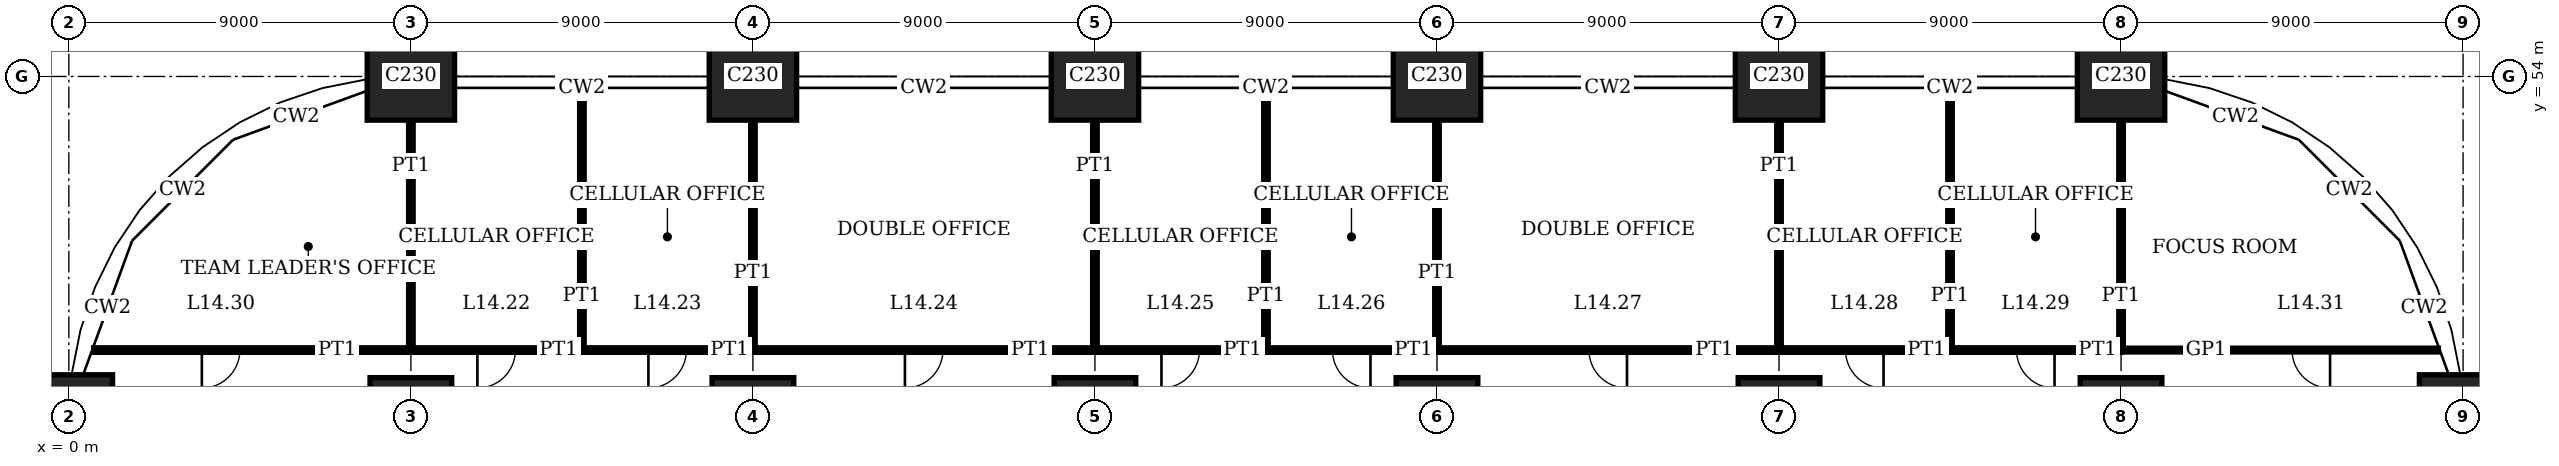
"""IFC4 building model, lengths in metres.
Left out: names, types, materials, properties, quantities, classifications, styles, units other than length and angle.
Written with IfcOpenShell. Run it as: python <this file> out.ifc"""

import sys

from ifc_helpers import new_model, si_unit, direction, frame, frame_2d, origin, origin_2d, place, context, subcontext, project, spatial, rectangle, extrude, element, fill, save


model = new_model("IFC4")
c1 = context("Model", 3, precision=1e-05, world=origin(), true_north=direction((0.0, 1.0)))
c2 = subcontext(c1, "Body", "Model", "MODEL_VIEW")
j1 = project(units=[si_unit("LENGTHUNIT", "METRE"), si_unit("PLANEANGLEUNIT", "RADIAN")], contexts=[c1])
p1 = place(None, origin())
s1 = spatial("IfcSite", under=j1, at=p1, CompositionType="ELEMENT")
p2 = place(p1, origin())
s2 = spatial("IfcBuilding", under=s1, at=p2, CompositionType="ELEMENT")
p3 = place(p2, frame((0.0, 0.0, 59.8)))
s3 = spatial("IfcBuildingStorey", under=s2, at=p3, CompositionType="ELEMENT", Elevation=59.8)
p4 = place(p3, frame((0.0, 45.0, 0.0), z_axis=(0.0, 0.0, 1.0), x_axis=(1.0, 0.0, 0.0)))
e1 = element("IfcColumn", 1, at=p4, inside=s3, PredefinedType="COLUMN", context=c2, shape_type="SweptSolid", body=[
    extrude(rectangle(XDim=2.3, YDim=2.3, at=origin_2d()), origin(), (0.0, 0.0, 1.0), 4.0),
])
p5 = place(p3, frame((9.0, 45.0, 0.0), z_axis=(0.0, 0.0, 1.0), x_axis=(1.0, 0.0, 0.0)))
e2 = element("IfcColumn", 2, at=p5, inside=s3, PredefinedType="COLUMN", context=c2, shape_type="SweptSolid", body=[
    extrude(rectangle(XDim=2.15, YDim=2.15, at=origin_2d()), origin(), (0.0, 0.0, 1.0), 4.0),
])
p6 = place(p3, frame((9.0, 54.0, 0.0), z_axis=(0.0, 0.0, 1.0), x_axis=(1.0, 0.0, 0.0)))
e3 = element("IfcColumn", 3, at=p6, inside=s3, PredefinedType="COLUMN", context=c2, shape_type="SweptSolid", body=[
    extrude(rectangle(XDim=2.3, YDim=2.3, at=origin_2d()), origin(), (0.0, 0.0, 1.0), 4.0),
])
p7 = place(p3, frame((18.0, 45.0, 0.0), z_axis=(0.0, 0.0, 1.0), x_axis=(1.0, 0.0, 0.0)))
e4 = element("IfcColumn", 4, at=p7, inside=s3, PredefinedType="COLUMN", context=c2, shape_type="SweptSolid", body=[
    extrude(rectangle(XDim=2.15, YDim=2.15, at=origin_2d()), origin(), (0.0, 0.0, 1.0), 4.0),
])
p8 = place(p3, frame((18.0, 54.0, 0.0), z_axis=(0.0, 0.0, 1.0), x_axis=(1.0, 0.0, 0.0)))
e5 = element("IfcColumn", 5, at=p8, inside=s3, PredefinedType="COLUMN", context=c2, shape_type="SweptSolid", body=[
    extrude(rectangle(XDim=2.3, YDim=2.3, at=origin_2d()), origin(), (0.0, 0.0, 1.0), 4.0),
])
p9 = place(p3, frame((27.0, 45.0, 0.0), z_axis=(0.0, 0.0, 1.0), x_axis=(1.0, 0.0, 0.0)))
e6 = element("IfcColumn", 6, at=p9, inside=s3, PredefinedType="COLUMN", context=c2, shape_type="SweptSolid", body=[
    extrude(rectangle(XDim=2.15, YDim=2.15, at=origin_2d()), origin(), (0.0, 0.0, 1.0), 4.0),
])
p10 = place(p3, frame((27.0, 54.0, 0.0), z_axis=(0.0, 0.0, 1.0), x_axis=(1.0, 0.0, 0.0)))
e7 = element("IfcColumn", 7, at=p10, inside=s3, PredefinedType="COLUMN", context=c2, shape_type="SweptSolid", body=[
    extrude(rectangle(XDim=2.3, YDim=2.3, at=origin_2d()), origin(), (0.0, 0.0, 1.0), 4.0),
])
p11 = place(p3, frame((36.0, 45.0, 0.0), z_axis=(0.0, 0.0, 1.0), x_axis=(1.0, 0.0, 0.0)))
e8 = element("IfcColumn", 8, at=p11, inside=s3, PredefinedType="COLUMN", context=c2, shape_type="SweptSolid", body=[
    extrude(rectangle(XDim=2.15, YDim=2.15, at=origin_2d()), origin(), (0.0, 0.0, 1.0), 4.0),
])
p12 = place(p3, frame((36.0, 54.0, 0.0), z_axis=(0.0, 0.0, 1.0), x_axis=(1.0, 0.0, 0.0)))
e9 = element("IfcColumn", 9, at=p12, inside=s3, PredefinedType="COLUMN", context=c2, shape_type="SweptSolid", body=[
    extrude(rectangle(XDim=2.3, YDim=2.3, at=origin_2d()), origin(), (0.0, 0.0, 1.0), 4.0),
])
p13 = place(p3, frame((45.0, 45.0, 0.0), z_axis=(0.0, 0.0, 1.0), x_axis=(1.0, 0.0, 0.0)))
e10 = element("IfcColumn", 10, at=p13, inside=s3, PredefinedType="COLUMN", context=c2, shape_type="SweptSolid", body=[
    extrude(rectangle(XDim=2.15, YDim=2.15, at=origin_2d()), origin(), (0.0, 0.0, 1.0), 4.0),
])
p14 = place(p3, frame((45.0, 54.0, 0.0), z_axis=(0.0, 0.0, 1.0), x_axis=(1.0, 0.0, 0.0)))
e11 = element("IfcColumn", 11, at=p14, inside=s3, PredefinedType="COLUMN", context=c2, shape_type="SweptSolid", body=[
    extrude(rectangle(XDim=2.3, YDim=2.3, at=origin_2d()), origin(), (0.0, 0.0, 1.0), 4.0),
])
p15 = place(p3, frame((54.0, 45.0, 0.0), z_axis=(0.0, 0.0, 1.0), x_axis=(1.0, 0.0, 0.0)))
e12 = element("IfcColumn", 12, at=p15, inside=s3, PredefinedType="COLUMN", context=c2, shape_type="SweptSolid", body=[
    extrude(rectangle(XDim=2.15, YDim=2.15, at=origin_2d()), origin(), (0.0, 0.0, 1.0), 4.0),
])
for number, where, z_axis, x_axis in (
    (13, (54.0, 54.0, 0.0), (0.0, 0.0, 1.0), (1.0, 0.0, 0.0)),
    (14, (63.0, 45.0, 0.0), (0.0, 0.0, 1.0), (1.0, 0.0, 0.0)),
):
    element("IfcColumn", number, at=place(p3, frame(where, z_axis=z_axis, x_axis=x_axis)), inside=s3, PredefinedType="COLUMN", context=c2, shape_type="SweptSolid", body=[
        extrude(rectangle(XDim=2.3, YDim=2.3, at=origin_2d()), origin(), (0.0, 0.0, 1.0), 4.0),
    ])
p16 = place(p3, frame((9.0, 46.8, 0.0), z_axis=(0.0, 0.0, 1.0), x_axis=(1.0, 0.0, 0.0)))
e15 = element("IfcWall", 15, at=p16, inside=s3, PredefinedType="PARTITIONING", context=c2, shape_type="SweptSolid", body=[
    extrude(rectangle(XDim=4.5, YDim=0.12, at=frame_2d((2.25, 0.0))), origin(), (0.0, 0.0, 1.0), 3.75),
])
p17 = place(p16, frame((1.75, 0.0, 0.0)))
e16 = element("IfcOpeningElement", 16, at=p17, cuts=e15, PredefinedType="OPENING", context=c2, shape_type="SweptSolid", body=[
    extrude(rectangle(XDim=1.0, YDim=2.4, at=frame_2d((0.5, 1.2))), frame((0.0, 0.07, 0.0), z_axis=(0.0, -1.0, 0.0), x_axis=(1.0, 0.0, 0.0)), (0.0, 0.0, 1.0), 0.14),
])
p18 = place(p3, frame((13.5, 46.8, 0.0), z_axis=(0.0, 0.0, 1.0), x_axis=(1.0, 0.0, 0.0)))
e17 = element("IfcWall", 17, at=p18, inside=s3, PredefinedType="PARTITIONING", context=c2, shape_type="SweptSolid", body=[
    extrude(rectangle(XDim=4.5, YDim=0.12, at=frame_2d((2.25, 0.0))), origin(), (0.0, 0.0, 1.0), 3.75),
])
p19 = place(p18, frame((1.75, 0.0, 0.0)))
e18 = element("IfcOpeningElement", 18, at=p19, cuts=e17, PredefinedType="OPENING", context=c2, shape_type="SweptSolid", body=[
    extrude(rectangle(XDim=1.0, YDim=2.4, at=frame_2d((0.5, 1.2))), frame((0.0, 0.07, 0.0), z_axis=(0.0, -1.0, 0.0), x_axis=(1.0, 0.0, 0.0)), (0.0, 0.0, 1.0), 0.14),
])
p20 = place(p3, frame((18.0, 46.8, 0.0), z_axis=(0.0, 0.0, 1.0), x_axis=(1.0, 0.0, 0.0)))
e19 = element("IfcWall", 19, at=p20, inside=s3, PredefinedType="PARTITIONING", context=c2, shape_type="SweptSolid", body=[
    extrude(rectangle(XDim=9.0, YDim=0.12, at=frame_2d((4.5, 0.0))), origin(), (0.0, 0.0, 1.0), 3.75),
])
p21 = place(p20, frame((4.0, 0.0, 0.0)))
e20 = element("IfcOpeningElement", 20, at=p21, cuts=e19, PredefinedType="OPENING", context=c2, shape_type="SweptSolid", body=[
    extrude(rectangle(XDim=1.0, YDim=2.4, at=frame_2d((0.5, 1.2))), frame((0.0, 0.07, 0.0), z_axis=(0.0, -1.0, 0.0), x_axis=(1.0, 0.0, 0.0)), (0.0, 0.0, 1.0), 0.14),
])
p22 = place(p3, frame((27.0, 46.8, 0.0), z_axis=(0.0, 0.0, 1.0), x_axis=(1.0, 0.0, 0.0)))
e21 = element("IfcWall", 21, at=p22, inside=s3, PredefinedType="PARTITIONING", context=c2, shape_type="SweptSolid", body=[
    extrude(rectangle(XDim=4.5, YDim=0.12, at=frame_2d((2.25, 0.0))), origin(), (0.0, 0.0, 1.0), 3.75),
])
p23 = place(p22, frame((1.75, 0.0, 0.0)))
e22 = element("IfcOpeningElement", 22, at=p23, cuts=e21, PredefinedType="OPENING", context=c2, shape_type="SweptSolid", body=[
    extrude(rectangle(XDim=1.0, YDim=2.4, at=frame_2d((0.5, 1.2))), frame((0.0, 0.07, 0.0), z_axis=(0.0, -1.0, 0.0), x_axis=(1.0, 0.0, 0.0)), (0.0, 0.0, 1.0), 0.14),
])
p24 = place(p3, frame((31.5, 46.8, 0.0), z_axis=(0.0, 0.0, 1.0), x_axis=(1.0, 0.0, 0.0)))
e23 = element("IfcWall", 23, at=p24, inside=s3, PredefinedType="PARTITIONING", context=c2, shape_type="SweptSolid", body=[
    extrude(rectangle(XDim=4.5, YDim=0.12, at=frame_2d((2.25, 0.0))), origin(), (0.0, 0.0, 1.0), 3.75),
])
p25 = place(p24, frame((1.75, 0.0, 0.0)))
e24 = element("IfcOpeningElement", 24, at=p25, cuts=e23, PredefinedType="OPENING", context=c2, shape_type="SweptSolid", body=[
    extrude(rectangle(XDim=1.0, YDim=2.4, at=frame_2d((0.5, 1.2))), frame((0.0, 0.07, 0.0), z_axis=(0.0, -1.0, 0.0), x_axis=(1.0, 0.0, 0.0)), (0.0, 0.0, 1.0), 0.14),
])
p26 = place(p3, frame((36.0, 46.8, 0.0), z_axis=(0.0, 0.0, 1.0), x_axis=(1.0, 0.0, 0.0)))
e25 = element("IfcWall", 25, at=p26, inside=s3, PredefinedType="PARTITIONING", context=c2, shape_type="SweptSolid", body=[
    extrude(rectangle(XDim=9.0, YDim=0.12, at=frame_2d((4.5, 0.0))), origin(), (0.0, 0.0, 1.0), 3.75),
])
p27 = place(p26, frame((4.0, 0.0, 0.0)))
e26 = element("IfcOpeningElement", 26, at=p27, cuts=e25, PredefinedType="OPENING", context=c2, shape_type="SweptSolid", body=[
    extrude(rectangle(XDim=1.0, YDim=2.4, at=frame_2d((0.5, 1.2))), frame((0.0, 0.07, 0.0), z_axis=(0.0, -1.0, 0.0), x_axis=(1.0, 0.0, 0.0)), (0.0, 0.0, 1.0), 0.14),
])
p28 = place(p3, frame((45.0, 46.8, 0.0), z_axis=(0.0, 0.0, 1.0), x_axis=(1.0, 0.0, 0.0)))
e27 = element("IfcWall", 27, at=p28, inside=s3, PredefinedType="PARTITIONING", context=c2, shape_type="SweptSolid", body=[
    extrude(rectangle(XDim=4.5, YDim=0.12, at=frame_2d((2.25, 0.0))), origin(), (0.0, 0.0, 1.0), 3.75),
])
p29 = place(p28, frame((1.75, 0.0, 0.0)))
e28 = element("IfcOpeningElement", 28, at=p29, cuts=e27, PredefinedType="OPENING", context=c2, shape_type="SweptSolid", body=[
    extrude(rectangle(XDim=1.0, YDim=2.4, at=frame_2d((0.5, 1.2))), frame((0.0, 0.07, 0.0), z_axis=(0.0, -1.0, 0.0), x_axis=(1.0, 0.0, 0.0)), (0.0, 0.0, 1.0), 0.14),
])
p30 = place(p3, frame((49.5, 46.8, 0.0), z_axis=(0.0, 0.0, 1.0), x_axis=(1.0, 0.0, 0.0)))
e29 = element("IfcWall", 29, at=p30, inside=s3, PredefinedType="PARTITIONING", context=c2, shape_type="SweptSolid", body=[
    extrude(rectangle(XDim=4.5, YDim=0.12, at=frame_2d((2.25, 0.0))), origin(), (0.0, 0.0, 1.0), 3.75),
])
p31 = place(p30, frame((1.75, 0.0, 0.0)))
e30 = element("IfcOpeningElement", 30, at=p31, cuts=e29, PredefinedType="OPENING", context=c2, shape_type="SweptSolid", body=[
    extrude(rectangle(XDim=1.0, YDim=2.4, at=frame_2d((0.5, 1.2))), frame((0.0, 0.07, 0.0), z_axis=(0.0, -1.0, 0.0), x_axis=(1.0, 0.0, 0.0)), (0.0, 0.0, 1.0), 0.14),
])
p32 = place(p3, frame((0.653, 46.8, 0.0), z_axis=(0.0, 0.0, 1.0), x_axis=(1.0, 0.0, 0.0)))
e31 = element("IfcWall", 31, at=p32, inside=s3, PredefinedType="PARTITIONING", context=c2, shape_type="SweptSolid", body=[
    extrude(rectangle(XDim=8.347, YDim=0.12, at=frame_2d((4.174, 0.0))), origin(), (0.0, 0.0, 1.0), 3.75),
])
p33 = place(p32, frame((2.847, 0.0, 0.0)))
e32 = element("IfcOpeningElement", 32, at=p33, cuts=e31, PredefinedType="OPENING", context=c2, shape_type="SweptSolid", body=[
    extrude(rectangle(XDim=1.0, YDim=2.4, at=frame_2d((0.5, 1.2))), frame((0.0, 0.07, 0.0), z_axis=(0.0, -1.0, 0.0), x_axis=(1.0, 0.0, 0.0)), (0.0, 0.0, 1.0), 0.14),
])
p34 = place(p3, frame((54.0, 46.8, 0.0), z_axis=(0.0, 0.0, 1.0), x_axis=(1.0, 0.0, 0.0)))
e33 = element("IfcWall", 33, at=p34, inside=s3, PredefinedType="PARTITIONING", context=c2, shape_type="SweptSolid", body=[
    extrude(rectangle(XDim=8.351, YDim=0.1, at=frame_2d((4.175, 0.0))), origin(), (0.0, 0.0, 1.0), 3.75),
])
p35 = place(p34, frame((4.5, 0.0, 0.0)))
e34 = element("IfcOpeningElement", 34, at=p35, cuts=e33, PredefinedType="OPENING", context=c2, shape_type="SweptSolid", body=[
    extrude(rectangle(XDim=1.0, YDim=2.4, at=frame_2d((0.5, 1.2))), frame((0.0, 0.06, 0.0), z_axis=(0.0, -1.0, 0.0), x_axis=(1.0, 0.0, 0.0)), (0.0, 0.0, 1.0), 0.12),
])
p36 = place(p3, frame((9.0, 46.8, 0.0), z_axis=(0.0, 0.0, 1.0), x_axis=(0.0, 1.0, 0.0)))
e35 = element("IfcWall", 35, at=p36, inside=s3, PredefinedType="PARTITIONING", context=c2, shape_type="SweptSolid", body=[
    extrude(rectangle(XDim=6.05, YDim=0.12, at=frame_2d((3.025, 0.0))), origin(), (0.0, 0.0, 1.0), 3.05),
])
p37 = place(p3, frame((13.5, 46.8, 0.0), z_axis=(0.0, 0.0, 1.0), x_axis=(0.0, 1.0, 0.0)))
e36 = element("IfcWall", 36, at=p37, inside=s3, PredefinedType="PARTITIONING", context=c2, shape_type="SweptSolid", body=[
    extrude(rectangle(XDim=6.89, YDim=0.12, at=frame_2d((3.445, 0.0))), origin(), (0.0, 0.0, 1.0), 3.75),
])
for number, where, z_axis, x_axis in (
    (37, (18.0, 46.8, 0.0), (0.0, 0.0, 1.0), (0.0, 1.0, 0.0)),
    (38, (27.0, 46.8, 0.0), (0.0, 0.0, 1.0), (0.0, 1.0, 0.0)),
):
    element("IfcWall", number, at=place(p3, frame(where, z_axis=z_axis, x_axis=x_axis)), inside=s3, PredefinedType="PARTITIONING", context=c2, shape_type="SweptSolid", body=[
        extrude(rectangle(XDim=6.05, YDim=0.12, at=frame_2d((3.025, 0.0))), origin(), (0.0, 0.0, 1.0), 3.05),
    ])
p38 = place(p3, frame((31.5, 46.8, 0.0), z_axis=(0.0, 0.0, 1.0), x_axis=(0.0, 1.0, 0.0)))
e39 = element("IfcWall", 39, at=p38, inside=s3, PredefinedType="PARTITIONING", context=c2, shape_type="SweptSolid", body=[
    extrude(rectangle(XDim=6.89, YDim=0.12, at=frame_2d((3.445, 0.0))), origin(), (0.0, 0.0, 1.0), 3.75),
])
for number, where, z_axis, x_axis in (
    (40, (36.0, 46.8, 0.0), (0.0, 0.0, 1.0), (0.0, 1.0, 0.0)),
    (41, (45.0, 46.8, 0.0), (0.0, 0.0, 1.0), (0.0, 1.0, 0.0)),
):
    element("IfcWall", number, at=place(p3, frame(where, z_axis=z_axis, x_axis=x_axis)), inside=s3, PredefinedType="PARTITIONING", context=c2, shape_type="SweptSolid", body=[
        extrude(rectangle(XDim=6.05, YDim=0.12, at=frame_2d((3.025, 0.0))), origin(), (0.0, 0.0, 1.0), 3.05),
    ])
p39 = place(p3, frame((49.5, 46.8, 0.0), z_axis=(0.0, 0.0, 1.0), x_axis=(0.0, 1.0, 0.0)))
e42 = element("IfcWall", 42, at=p39, inside=s3, PredefinedType="PARTITIONING", context=c2, shape_type="SweptSolid", body=[
    extrude(rectangle(XDim=6.89, YDim=0.12, at=frame_2d((3.445, 0.0))), origin(), (0.0, 0.0, 1.0), 3.75),
])
p40 = place(p3, frame((54.0, 46.8, 0.0), z_axis=(0.0, 0.0, 1.0), x_axis=(0.0, 1.0, 0.0)))
e43 = element("IfcWall", 43, at=p40, inside=s3, PredefinedType="PARTITIONING", context=c2, shape_type="SweptSolid", body=[
    extrude(rectangle(XDim=6.05, YDim=0.12, at=frame_2d((3.025, 0.0))), origin(), (0.0, 0.0, 1.0), 3.05),
])
p41 = place(p17, origin())
e44 = element("IfcDoor", 44, at=p41, inside=s3, OperationType="SINGLE_SWING_LEFT", PredefinedType="DOOR", context=c2, shape_type="SweptSolid", body=[
    extrude(rectangle(XDim=1.0, YDim=2.4, at=frame_2d((0.5, 1.2))), frame((0.0, 0.025, 0.0), z_axis=(0.0, -1.0, 0.0), x_axis=(1.0, 0.0, 0.0)), (0.0, 0.0, 1.0), 0.05),
])
fill(e16, e44)
p42 = place(p19, origin())
e45 = element("IfcDoor", 45, at=p42, inside=s3, OperationType="SINGLE_SWING_LEFT", PredefinedType="DOOR", context=c2, shape_type="SweptSolid", body=[
    extrude(rectangle(XDim=1.0, YDim=2.4, at=frame_2d((0.5, 1.2))), frame((0.0, 0.025, 0.0), z_axis=(0.0, -1.0, 0.0), x_axis=(1.0, 0.0, 0.0)), (0.0, 0.0, 1.0), 0.05),
])
fill(e18, e45)
p43 = place(p21, origin())
e46 = element("IfcDoor", 46, at=p43, inside=s3, OperationType="SINGLE_SWING_LEFT", PredefinedType="DOOR", context=c2, shape_type="SweptSolid", body=[
    extrude(rectangle(XDim=1.0, YDim=2.4, at=frame_2d((0.5, 1.2))), frame((0.0, 0.025, 0.0), z_axis=(0.0, -1.0, 0.0), x_axis=(1.0, 0.0, 0.0)), (0.0, 0.0, 1.0), 0.05),
])
fill(e20, e46)
p44 = place(p23, origin())
e47 = element("IfcDoor", 47, at=p44, inside=s3, OperationType="SINGLE_SWING_LEFT", PredefinedType="DOOR", context=c2, shape_type="SweptSolid", body=[
    extrude(rectangle(XDim=1.0, YDim=2.4, at=frame_2d((0.5, 1.2))), frame((0.0, 0.025, 0.0), z_axis=(0.0, -1.0, 0.0), x_axis=(1.0, 0.0, 0.0)), (0.0, 0.0, 1.0), 0.05),
])
fill(e22, e47)
p45 = place(p25, origin())
e48 = element("IfcDoor", 48, at=p45, inside=s3, OperationType="SINGLE_SWING_RIGHT", PredefinedType="DOOR", context=c2, shape_type="SweptSolid", body=[
    extrude(rectangle(XDim=1.0, YDim=2.4, at=frame_2d((0.5, 1.2))), frame((0.0, 0.025, 0.0), z_axis=(0.0, -1.0, 0.0), x_axis=(1.0, 0.0, 0.0)), (0.0, 0.0, 1.0), 0.05),
])
fill(e24, e48)
p46 = place(p27, origin())
e49 = element("IfcDoor", 49, at=p46, inside=s3, OperationType="SINGLE_SWING_RIGHT", PredefinedType="DOOR", context=c2, shape_type="SweptSolid", body=[
    extrude(rectangle(XDim=1.0, YDim=2.4, at=frame_2d((0.5, 1.2))), frame((0.0, 0.025, 0.0), z_axis=(0.0, -1.0, 0.0), x_axis=(1.0, 0.0, 0.0)), (0.0, 0.0, 1.0), 0.05),
])
fill(e26, e49)
p47 = place(p29, origin())
e50 = element("IfcDoor", 50, at=p47, inside=s3, OperationType="SINGLE_SWING_RIGHT", PredefinedType="DOOR", context=c2, shape_type="SweptSolid", body=[
    extrude(rectangle(XDim=1.0, YDim=2.4, at=frame_2d((0.5, 1.2))), frame((0.0, 0.025, 0.0), z_axis=(0.0, -1.0, 0.0), x_axis=(1.0, 0.0, 0.0)), (0.0, 0.0, 1.0), 0.05),
])
fill(e28, e50)
p48 = place(p31, origin())
e51 = element("IfcDoor", 51, at=p48, inside=s3, OperationType="SINGLE_SWING_RIGHT", PredefinedType="DOOR", context=c2, shape_type="SweptSolid", body=[
    extrude(rectangle(XDim=1.0, YDim=2.4, at=frame_2d((0.5, 1.2))), frame((0.0, 0.025, 0.0), z_axis=(0.0, -1.0, 0.0), x_axis=(1.0, 0.0, 0.0)), (0.0, 0.0, 1.0), 0.05),
])
fill(e30, e51)
p49 = place(p33, origin())
e52 = element("IfcDoor", 52, at=p49, inside=s3, OperationType="SINGLE_SWING_LEFT", PredefinedType="DOOR", context=c2, shape_type="SweptSolid", body=[
    extrude(rectangle(XDim=1.0, YDim=2.4, at=frame_2d((0.5, 1.2))), frame((0.0, 0.025, 0.0), z_axis=(0.0, -1.0, 0.0), x_axis=(1.0, 0.0, 0.0)), (0.0, 0.0, 1.0), 0.05),
])
fill(e32, e52)
p50 = place(p35, origin())
e53 = element("IfcDoor", 53, at=p50, inside=s3, OperationType="SINGLE_SWING_RIGHT", PredefinedType="DOOR", context=c2, shape_type="SweptSolid", body=[
    extrude(rectangle(XDim=1.0, YDim=2.4, at=frame_2d((0.5, 1.2))), frame((0.0, 0.02, 0.0), z_axis=(0.0, -1.0, 0.0), x_axis=(1.0, 0.0, 0.0)), (0.0, 0.0, 1.0), 0.04),
])
fill(e34, e53)
save(model, sys.argv[1])
